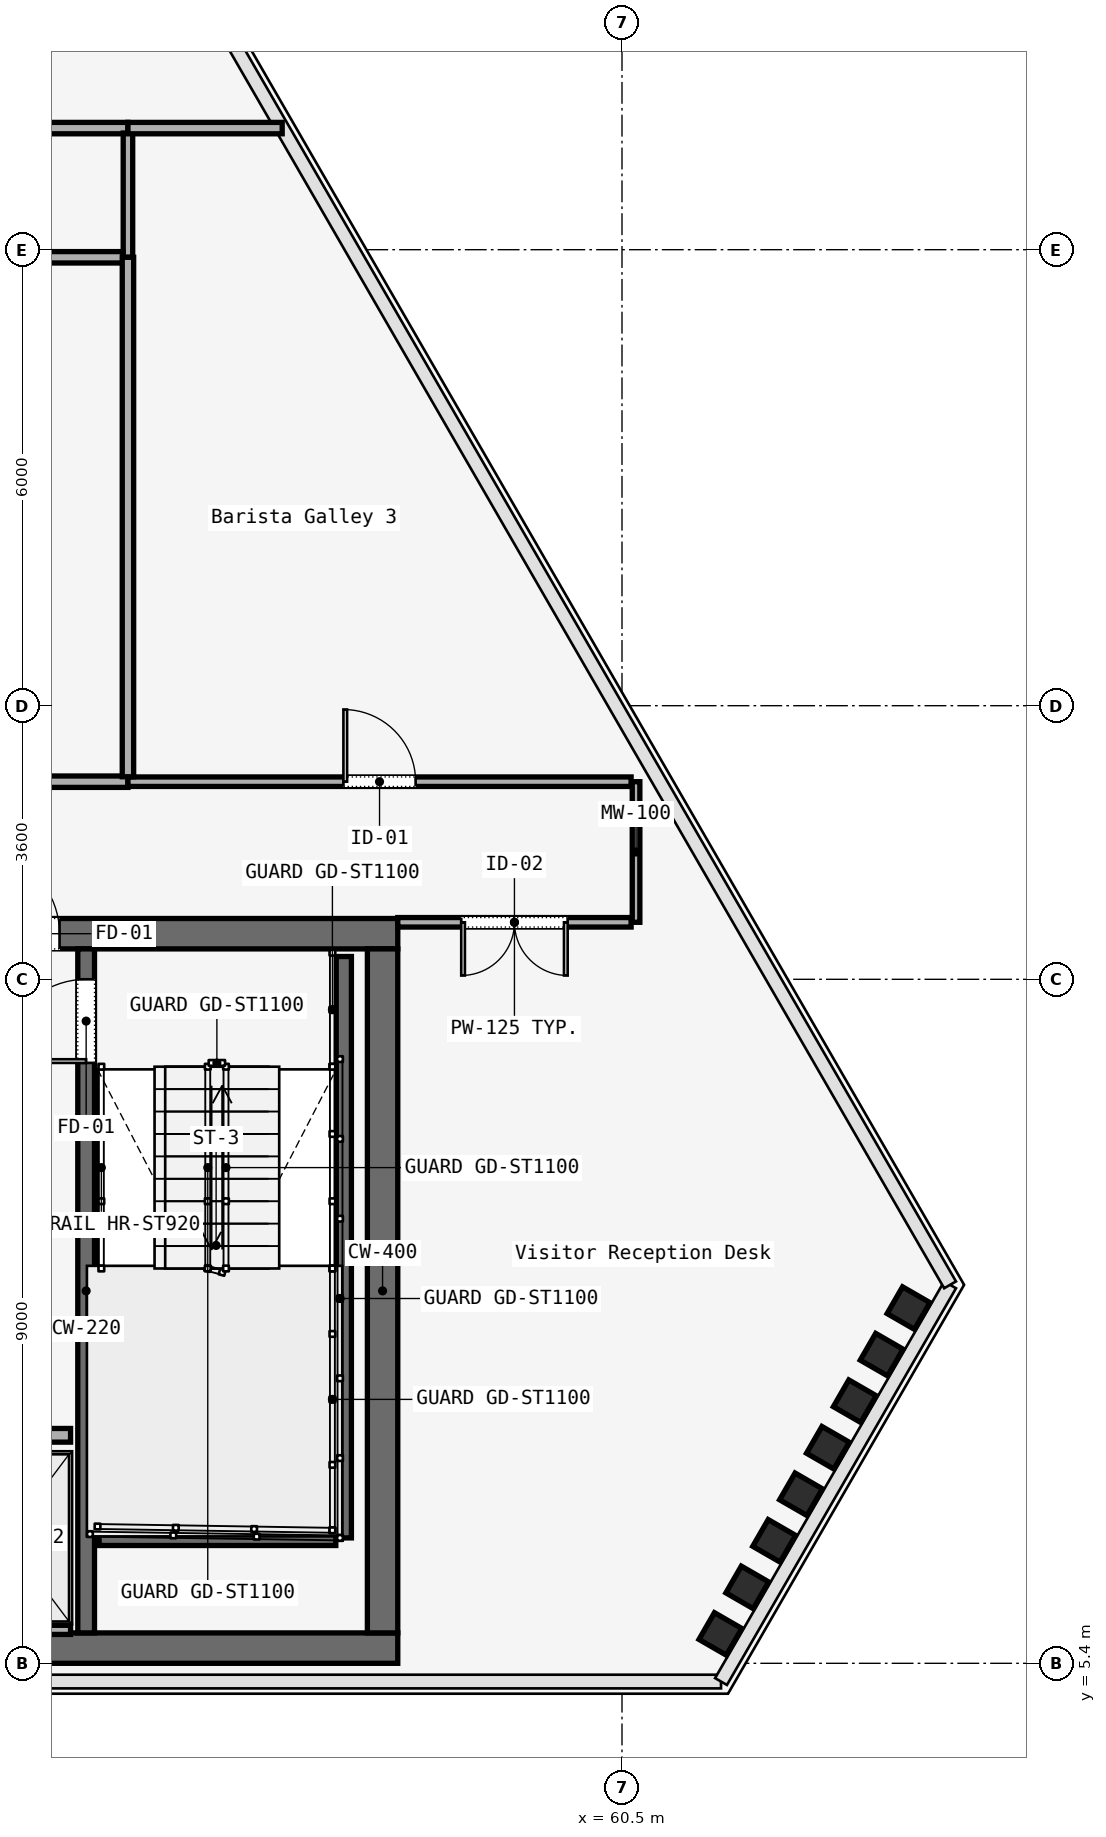
"""IFC4 building model, lengths in metres.
Left out: names, types, materials, properties, quantities, classifications, styles, units other than length and angle.
Written with IfcOpenShell. Run it as: python <this file> out.ifc"""

import sys

from ifc_helpers import new_model, si_unit, direction, frame, frame_2d, origin, origin_2d, place, context, subcontext, project, spatial, rectangle, i_section, extrude, element, fill, save


model = new_model("IFC4")
c1 = context("Model", 3, precision=1e-05, world=origin(), true_north=direction((0.0, 1.0)))
c2 = subcontext(c1, "Body", "Model", "MODEL_VIEW")
j1 = project(units=[si_unit("LENGTHUNIT", "METRE"), si_unit("PLANEANGLEUNIT", "RADIAN")], contexts=[c1])
p1 = place(None, origin())
s1 = spatial("IfcSite", under=j1, at=p1, CompositionType="ELEMENT")
p2 = place(p1, origin())
s2 = spatial("IfcBuilding", under=s1, at=p2, CompositionType="ELEMENT")
p3 = place(p2, frame((0.0, 0.0, 259.8)))
s3 = spatial("IfcBuildingStorey", under=s2, at=p3, CompositionType="ELEMENT", Elevation=259.8)
p4 = place(p3, frame((26.45, 15.0, 0.0), z_axis=(0.0, 0.0, 1.0), x_axis=(1.0, 0.0, 0.0)))
e1 = element("IfcWall", 1, at=p4, inside=s3, PredefinedType="SOLIDWALL", context=c2, shape_type="SweptSolid", body=[
    extrude(rectangle(XDim=31.1, YDim=0.4, at=frame_2d((15.55, 0.0))), origin(), (0.0, 0.0, 1.0), 3.58),
])
p5 = place(p4, frame((1.65, 0.0, 0.0)))
e2 = element("IfcOpeningElement", 2, at=p5, cuts=e1, PredefinedType="OPENING", context=c2, shape_type="SweptSolid", body=[
    extrude(rectangle(XDim=1.1, YDim=2.2, at=frame_2d((0.55, 1.1))), frame((0.0, 0.2, 0.0), z_axis=(0.0, -1.0, 0.0), x_axis=(1.0, 0.0, 0.0)), (0.0, 0.0, 1.0), 0.4),
])
p6 = place(p4, frame((13.65, 0.0, 0.0)))
e3 = element("IfcOpeningElement", 3, at=p6, cuts=e1, PredefinedType="OPENING", context=c2, shape_type="SweptSolid", body=[
    extrude(rectangle(XDim=1.1, YDim=2.2, at=frame_2d((0.55, 1.1))), frame((0.0, 0.2, 0.0), z_axis=(0.0, -1.0, 0.0), x_axis=(1.0, 0.0, 0.0)), (0.0, 0.0, 1.0), 0.4),
])
p7 = place(p4, frame((25.55, 0.0, 0.0)))
e4 = element("IfcOpeningElement", 4, at=p7, cuts=e1, PredefinedType="OPENING", context=c2, shape_type="SweptSolid", body=[
    extrude(rectangle(XDim=1.1, YDim=2.2, at=frame_2d((0.55, 1.1))), frame((0.0, 0.2, 0.0), z_axis=(0.0, -1.0, 0.0), x_axis=(1.0, 0.0, 0.0)), (0.0, 0.0, 1.0), 0.4),
])
p8 = place(p4, frame((19.35, 0.0, 0.0)))
e5 = element("IfcOpeningElement", 5, at=p8, cuts=e1, PredefinedType="OPENING", context=c2, shape_type="SweptSolid", body=[
    extrude(rectangle(XDim=1.1, YDim=2.2, at=frame_2d((0.55, 1.1))), frame((0.0, 0.2, 0.0), z_axis=(0.0, -1.0, 0.0), x_axis=(1.0, 0.0, 0.0)), (0.0, 0.0, 1.0), 0.4),
])
p9 = place(p4, frame((21.4, 0.0, 0.0)))
e6 = element("IfcOpeningElement", 6, at=p9, cuts=e1, PredefinedType="OPENING", context=c2, shape_type="SweptSolid", body=[
    extrude(rectangle(XDim=0.9, YDim=2.1, at=frame_2d((0.45, 1.05))), frame((0.0, 0.2, 0.0), z_axis=(0.0, -1.0, 0.0), x_axis=(1.0, 0.0, 0.0)), (0.0, 0.0, 1.0), 0.4),
])
p10 = place(p4, frame((5.54, 0.0, 0.0)))
e7 = element("IfcOpeningElement", 7, at=p10, cuts=e1, PredefinedType="OPENING", context=c2, shape_type="SweptSolid", body=[
    extrude(rectangle(XDim=0.95, YDim=2.2, at=frame_2d((0.475, 1.1))), frame((0.0, 0.2, 0.0), z_axis=(0.0, -1.0, 0.0), x_axis=(1.0, 0.0, 0.0)), (0.0, 0.0, 1.0), 0.4),
])
p11 = place(p4, frame((9.49, 0.0, 0.0)))
e8 = element("IfcOpeningElement", 8, at=p11, cuts=e1, PredefinedType="OPENING", context=c2, shape_type="SweptSolid", body=[
    extrude(rectangle(XDim=0.95, YDim=2.2, at=frame_2d((0.475, 1.1))), frame((0.0, 0.2, 0.0), z_axis=(0.0, -1.0, 0.0), x_axis=(1.0, 0.0, 0.0)), (0.0, 0.0, 1.0), 0.4),
])
p12 = place(p4, frame((23.35, 0.0, 0.0)))
e9 = element("IfcOpeningElement", 9, at=p12, cuts=e1, PredefinedType="OPENING", context=c2, shape_type="SweptSolid", body=[
    extrude(rectangle(XDim=1.3, YDim=2.3, at=frame_2d((0.65, 1.15))), frame((0.0, 0.2, 0.0), z_axis=(0.0, -1.0, 0.0), x_axis=(1.0, 0.0, 0.0)), (0.0, 0.0, 1.0), 0.4),
])
p13 = place(p3, frame((26.45, 5.6, 0.0), z_axis=(0.0, 0.0, 1.0), x_axis=(1.0, 0.0, 0.0)))
e10 = element("IfcWall", 10, at=p13, inside=s3, PredefinedType="SOLIDWALL", context=c2, shape_type="SweptSolid", body=[
    extrude(rectangle(XDim=31.1, YDim=0.4, at=frame_2d((15.55, 0.0))), origin(), (0.0, 0.0, 1.0), 3.58),
])
p14 = place(p3, frame((57.35, 5.8, 0.0), z_axis=(0.0, 0.0, 1.0), x_axis=(0.0, 1.0, 0.0)))
e11 = element("IfcWall", 11, at=p14, inside=s3, PredefinedType="SOLIDWALL", context=c2, shape_type="SweptSolid", body=[
    extrude(rectangle(XDim=9.0, YDim=0.4, at=frame_2d((4.5, 0.0))), origin(), (0.0, 0.0, 1.0), 3.58),
])
p15 = place(p3, frame((53.45, 5.8, 0.0), z_axis=(0.0, 0.0, 1.0), x_axis=(0.0, 1.0, 0.0)))
e12 = element("IfcWall", 12, at=p15, inside=s3, PredefinedType="SOLIDWALL", context=c2, shape_type="SweptSolid", body=[
    extrude(rectangle(XDim=9.0, YDim=0.22, at=frame_2d((4.5, 0.0))), origin(), (0.0, 0.0, 1.0), 3.58),
])
p16 = place(p15, frame((7.5, 0.0, 0.0)))
e13 = element("IfcOpeningElement", 13, at=p16, cuts=e12, PredefinedType="OPENING", context=c2, shape_type="SweptSolid", body=[
    extrude(rectangle(XDim=1.1, YDim=2.2, at=frame_2d((0.55, 1.1))), frame((0.0, 0.11, 0.0), z_axis=(0.0, -1.0, 0.0), x_axis=(1.0, 0.0, 0.0)), (0.0, 0.0, 1.0), 0.22),
])
p17 = place(p3, frame((61.795, 5.786, 0.0), z_axis=(0.022499111872, -0.008522390861, 0.999710537515), x_axis=(-0.632523877391, 0.774260559272, 0.020835807778)))
e14 = element("IfcColumn", 14, at=p17, inside=s3, PredefinedType="COLUMN", context=c2, shape_type="SweptSolid", body=[
    extrude(i_section(OverallWidth=0.406, OverallDepth=0.416, WebThickness=0.03, FlangeThickness=0.037, FilletRadius=0.015, at=origin_2d()), origin(), (0.0, 0.0, 1.0), 3.581),
])
p18 = place(p3, frame((62.149, 6.399, 0.0), z_axis=(0.012543459199, -0.025700457164, 0.999590990422), x_axis=(0.069645069236, 0.997264345813, 0.024766689329)))
e15 = element("IfcColumn", 15, at=p18, inside=s3, PredefinedType="COLUMN", context=c2, shape_type="SweptSolid", body=[
    extrude(i_section(OverallWidth=0.406, OverallDepth=0.416, WebThickness=0.03, FlangeThickness=0.037, FilletRadius=0.015, at=origin_2d()), origin(), (0.0, 0.0, 1.0), 3.581),
])
p19 = place(p3, frame((62.502, 7.011, 0.0), z_axis=(0.002657310403, -0.042789511113, 0.999080575549), x_axis=(0.445409548678, 0.894556779236, 0.037128192386)))
e16 = element("IfcColumn", 16, at=p19, inside=s3, PredefinedType="COLUMN", context=c2, shape_type="SweptSolid", body=[
    extrude(i_section(OverallWidth=0.406, OverallDepth=0.416, WebThickness=0.03, FlangeThickness=0.037, FilletRadius=0.015, at=origin_2d()), origin(), (0.0, 0.0, 1.0), 3.583),
])
p20 = place(p3, frame((62.856, 7.624, 0.0), z_axis=(-0.007215908337, -0.059905654117, 0.998177961724), x_axis=(0.599791024145, 0.798448595596, 0.052254832755)))
e17 = element("IfcColumn", 17, at=p20, inside=s3, PredefinedType="COLUMN", context=c2, shape_type="SweptSolid", body=[
    extrude(i_section(OverallWidth=0.406, OverallDepth=0.416, WebThickness=0.03, FlangeThickness=0.037, FilletRadius=0.015, at=origin_2d()), origin(), (0.0, 0.0, 1.0), 3.586),
])
p21 = place(p3, frame((63.209, 8.236, 0.0), z_axis=(-0.017064735315, -0.076893289409, 0.99689328258), x_axis=(0.67517089235, 0.734500802425, 0.068211709849)))
e18 = element("IfcColumn", 18, at=p21, inside=s3, PredefinedType="COLUMN", context=c2, shape_type="SweptSolid", body=[
    extrude(i_section(OverallWidth=0.406, OverallDepth=0.416, WebThickness=0.03, FlangeThickness=0.037, FilletRadius=0.015, at=origin_2d()), origin(), (0.0, 0.0, 1.0), 3.591),
])
p22 = place(p3, frame((63.563, 8.849, 0.0), z_axis=(-0.026877706532, -0.093868353874, 0.995221744654), x_axis=(0.717936594884, 0.690953534256, 0.084559205446)))
e19 = element("IfcColumn", 19, at=p22, inside=s3, PredefinedType="COLUMN", context=c2, shape_type="SweptSolid", body=[
    extrude(i_section(OverallWidth=0.406, OverallDepth=0.416, WebThickness=0.03, FlangeThickness=0.037, FilletRadius=0.015, at=origin_2d()), origin(), (0.0, 0.0, 1.0), 3.597),
])
p23 = place(p3, frame((63.917, 9.461, 0.0), z_axis=(-0.036711351122, -0.110743651449, 0.993170740791), x_axis=(0.74524466961, 0.659091399344, 0.101039149482)))
e20 = element("IfcColumn", 20, at=p23, inside=s3, PredefinedType="COLUMN", context=c2, shape_type="SweptSolid", body=[
    extrude(i_section(OverallWidth=0.406, OverallDepth=0.416, WebThickness=0.03, FlangeThickness=0.037, FilletRadius=0.015, at=origin_2d()), origin(), (0.0, 0.0, 1.0), 3.604),
])
p24 = place(p3, frame((64.27, 10.073, 0.0), z_axis=(-0.046420109636, -0.127368131971, 0.990768657346), x_axis=(0.763582650894, 0.634947584087, 0.117401451079)))
e21 = element("IfcColumn", 21, at=p24, inside=s3, PredefinedType="COLUMN", context=c2, shape_type="SweptSolid", body=[
    extrude(i_section(OverallWidth=0.406, OverallDepth=0.416, WebThickness=0.03, FlangeThickness=0.037, FilletRadius=0.015, at=origin_2d()), origin(), (0.0, 0.0, 1.0), 3.613),
])
p25 = place(p3, frame((56.84, 14.7, 0.0), z_axis=(0.0, 0.0, 1.0), x_axis=(0.0, -1.0, 0.0)))
e22 = element("IfcWall", 22, at=p25, inside=s3, PredefinedType="SOLIDWALL", context=c2, shape_type="SweptSolid", body=[
    extrude(rectangle(XDim=7.65, YDim=0.2, at=frame_2d((3.825, 0.0))), origin(), (0.0, 0.0, 1.0), 3.8),
])
p26 = place(p3, frame((53.62, 7.05, 0.0), z_axis=(0.0, 0.0, 1.0), x_axis=(1.0, 0.0, 0.0)))
e23 = element("IfcWall", 23, at=p26, inside=s3, PredefinedType="SOLIDWALL", context=c2, shape_type="SweptSolid", body=[
    extrude(rectangle(XDim=3.115, YDim=0.2, at=frame_2d((1.558, 0.0))), origin(), (0.0, 0.0, 1.0), 3.8),
])
p27 = place(p3, frame((51.555, 8.4, 0.0), z_axis=(0.0, 0.0, 1.0), x_axis=(1.0, 0.0, 0.0)))
e24 = element("IfcWall", 24, at=p27, inside=s3, PredefinedType="SOLIDWALL", context=c2, shape_type="SweptSolid", body=[
    extrude(rectangle(XDim=1.69, YDim=0.18, at=frame_2d((0.845, 0.0))), origin(), (0.0, 0.0, 1.0), 3.01),
])
p28 = place(p27, frame((0.295, 0.0, 0.0)))
e25 = element("IfcOpeningElement", 25, at=p28, cuts=e24, PredefinedType="OPENING", context=c2, shape_type="SweptSolid", body=[
    extrude(rectangle(XDim=1.1, YDim=2.2, at=frame_2d((0.55, 1.1))), frame((0.0, 0.09, 0.0), z_axis=(0.0, -1.0, 0.0), x_axis=(1.0, 0.0, 0.0)), (0.0, 0.0, 1.0), 0.18),
])
p29 = place(p3, frame((51.555, 5.84, 0.0), z_axis=(0.0, 0.0, 1.0), x_axis=(1.0, 0.0, 0.0)))
e26 = element("IfcWall", 26, at=p29, inside=s3, PredefinedType="SOLIDWALL", context=c2, shape_type="SweptSolid", body=[
    extrude(rectangle(XDim=1.69, YDim=0.12, at=frame_2d((0.845, 0.0))), origin(), (0.0, 0.0, 1.0), 3.01),
])
p30 = place(p3, frame((60.685, 17.0, 0.0), z_axis=(0.0, 0.0, 1.0), x_axis=(0.0, -1.0, 0.0)))
e27 = element("IfcWall", 27, at=p30, inside=s3, PredefinedType="MOVABLE", context=c2, shape_type="SweptSolid", body=[
    extrude(rectangle(XDim=1.85, YDim=0.1, at=frame_2d((0.925, 0.0))), origin(), (0.0, 0.0, 1.0), 3.01),
])
p31 = place(p3, frame((60.62, 15.15, 0.0), z_axis=(0.0, 0.0, 1.0), x_axis=(-1.0, 0.0, 0.0)))
e28 = element("IfcWall", 28, at=p31, inside=s3, PredefinedType="PARTITIONING", context=c2, shape_type="SweptSolid", body=[
    extrude(rectangle(XDim=3.07, YDim=0.125, at=frame_2d((1.535, 0.0))), origin(), (0.0, 0.0, 1.0), 3.01),
])
p32 = place(p31, frame((0.835, 0.0, 0.0)))
e29 = element("IfcOpeningElement", 29, at=p32, cuts=e28, PredefinedType="OPENING", context=c2, shape_type="SweptSolid", body=[
    extrude(rectangle(XDim=1.4, YDim=2.2, at=frame_2d((0.7, 1.1))), frame((0.0, 0.062, 0.0), z_axis=(0.0, -1.0, 0.0), x_axis=(1.0, 0.0, 0.0)), (0.0, 0.0, 1.0), 0.125),
])
p33 = place(p3, frame((50.71, 25.6, 0.0), z_axis=(0.0, 0.0, 1.0), x_axis=(1.0, 0.0, 0.0)))
e30 = element("IfcWall", 30, at=p33, inside=s3, PredefinedType="PARTITIONING", context=c2, shape_type="SweptSolid", body=[
    extrude(rectangle(XDim=3.29, YDim=0.15, at=frame_2d((1.645, 0.0))), origin(), (0.0, 0.0, 1.0), 3.01),
])
p34 = place(p33, frame((1.195, 0.0, 0.0)))
e31 = element("IfcOpeningElement", 31, at=p34, cuts=e30, PredefinedType="OPENING", context=c2, shape_type="SweptSolid", body=[
    extrude(rectangle(XDim=0.9, YDim=2.15, at=frame_2d((0.45, 1.075))), frame((0.0, 0.075, 0.0), z_axis=(0.0, -1.0, 0.0), x_axis=(1.0, 0.0, 0.0)), (0.0, 0.0, 1.0), 0.15),
])
p35 = place(p3, frame((54.0, 25.535, 0.0), z_axis=(0.0, 0.0, 1.0), x_axis=(0.0, -1.0, 0.0)))
e32 = element("IfcWall", 32, at=p35, inside=s3, PredefinedType="PARTITIONING", context=c2, shape_type="SweptSolid", body=[
    extrude(rectangle(XDim=1.635, YDim=0.125, at=frame_2d((0.817, 0.0))), origin(), (0.0, 0.0, 1.0), 3.01),
])
p36 = place(p3, frame((53.935, 23.9, 0.0), z_axis=(0.0, 0.0, 1.0), x_axis=(-1.0, 0.0, 0.0)))
e33 = element("IfcWall", 33, at=p36, inside=s3, PredefinedType="PARTITIONING", context=c2, shape_type="SweptSolid", body=[
    extrude(rectangle(XDim=11.085, YDim=0.15, at=frame_2d((5.542, 0.0))), origin(), (0.0, 0.0, 1.0), 3.01),
])
p37 = place(p36, frame((5.067, 0.0, 0.0)))
e34 = element("IfcOpeningElement", 34, at=p37, cuts=e33, PredefinedType="OPENING", context=c2, shape_type="SweptSolid", body=[
    extrude(rectangle(XDim=0.95, YDim=2.2, at=frame_2d((0.475, 1.1))), frame((0.0, 0.075, 0.0), z_axis=(0.0, -1.0, 0.0), x_axis=(1.0, 0.0, 0.0)), (0.0, 0.0, 1.0), 0.15),
])
p38 = place(p3, frame((42.915, 17.0, 0.0), z_axis=(0.0, 0.0, 1.0), x_axis=(1.0, 0.0, 0.0)))
e35 = element("IfcWall", 35, at=p38, inside=s3, PredefinedType="PARTITIONING", context=c2, shape_type="SweptSolid", body=[
    extrude(rectangle(XDim=11.085, YDim=0.15, at=frame_2d((5.542, 0.0))), origin(), (0.0, 0.0, 1.0), 3.01),
])
p39 = place(p3, frame((54.0, 17.0, 0.0), z_axis=(0.0, 0.0, 1.0), x_axis=(1.0, 0.0, 0.0)))
e36 = element("IfcWall", 36, at=p39, inside=s3, PredefinedType="PARTITIONING", context=c2, shape_type="SweptSolid", body=[
    extrude(rectangle(XDim=6.62, YDim=0.125, at=frame_2d((3.31, 0.0))), origin(), (0.0, 0.0, 1.0), 3.01),
])
p40 = place(p39, frame((2.835, 0.0, 0.0)))
e37 = element("IfcOpeningElement", 37, at=p40, cuts=e36, PredefinedType="OPENING", context=c2, shape_type="SweptSolid", body=[
    extrude(rectangle(XDim=0.95, YDim=2.2, at=frame_2d((0.475, 1.1))), frame((0.0, 0.062, 0.0), z_axis=(0.0, -1.0, 0.0), x_axis=(1.0, 0.0, 0.0)), (0.0, 0.0, 1.0), 0.125),
])
p41 = place(p3, frame((54.0, 23.9, 0.0), z_axis=(0.0, 0.0, 1.0), x_axis=(0.0, -1.0, 0.0)))
e38 = element("IfcWall", 38, at=p41, inside=s3, PredefinedType="PARTITIONING", context=c2, shape_type="SweptSolid", body=[
    extrude(rectangle(XDim=6.835, YDim=0.15, at=frame_2d((3.417, 0.0))), origin(), (0.0, 0.0, 1.0), 3.01),
])
p42 = place(p3, frame((54.0, 25.6, 0.0), z_axis=(0.0, 0.0, 1.0), x_axis=(1.0, 0.0, 0.0)))
e39 = element("IfcWall", 39, at=p42, inside=s3, PredefinedType="PARTITIONING", context=c2, shape_type="SweptSolid", body=[
    extrude(rectangle(XDim=2.029, YDim=0.15, at=frame_2d((1.015, 0.0))), origin(), (0.0, 0.0, 1.0), 3.01),
])
p43 = place(p7, origin())
e40 = element("IfcDoor", 40, at=p43, inside=s3, OperationType="SINGLE_SWING_RIGHT", PredefinedType="DOOR", context=c2, shape_type="SweptSolid", body=[
    extrude(rectangle(XDim=1.1, YDim=2.2, at=frame_2d((0.55, 1.1))), frame((0.0, 0.025, 0.0), z_axis=(0.0, -1.0, 0.0), x_axis=(1.0, 0.0, 0.0)), (0.0, 0.0, 1.0), 0.05),
])
fill(e4, e40)
p44 = place(p16, origin())
e41 = element("IfcDoor", 41, at=p44, inside=s3, OperationType="SINGLE_SWING_LEFT", PredefinedType="DOOR", context=c2, shape_type="SweptSolid", body=[
    extrude(rectangle(XDim=1.1, YDim=2.2, at=frame_2d((0.55, 1.1))), frame((0.0, 0.025, 0.0), z_axis=(0.0, -1.0, 0.0), x_axis=(1.0, 0.0, 0.0)), (0.0, 0.0, 1.0), 0.05),
])
fill(e13, e41)
p45 = place(p32, origin())
e42 = element("IfcDoor", 42, at=p45, inside=s3, OperationType="SINGLE_SWING_LEFT", PredefinedType="DOOR", context=c2, shape_type="SweptSolid", body=[
    extrude(rectangle(XDim=1.4, YDim=2.2, at=frame_2d((0.7, 1.1))), frame((0.0, 0.025, 0.0), z_axis=(0.0, -1.0, 0.0), x_axis=(1.0, 0.0, 0.0)), (0.0, 0.0, 1.0), 0.05),
])
fill(e29, e42)
p46 = place(p40, origin())
e43 = element("IfcDoor", 43, at=p46, inside=s3, OperationType="SINGLE_SWING_LEFT", PredefinedType="DOOR", context=c2, shape_type="SweptSolid", body=[
    extrude(rectangle(XDim=0.95, YDim=2.2, at=frame_2d((0.475, 1.1))), frame((0.0, 0.025, 0.0), z_axis=(0.0, -1.0, 0.0), x_axis=(1.0, 0.0, 0.0)), (0.0, 0.0, 1.0), 0.05),
])
fill(e37, e43)
save(model, sys.argv[1])
